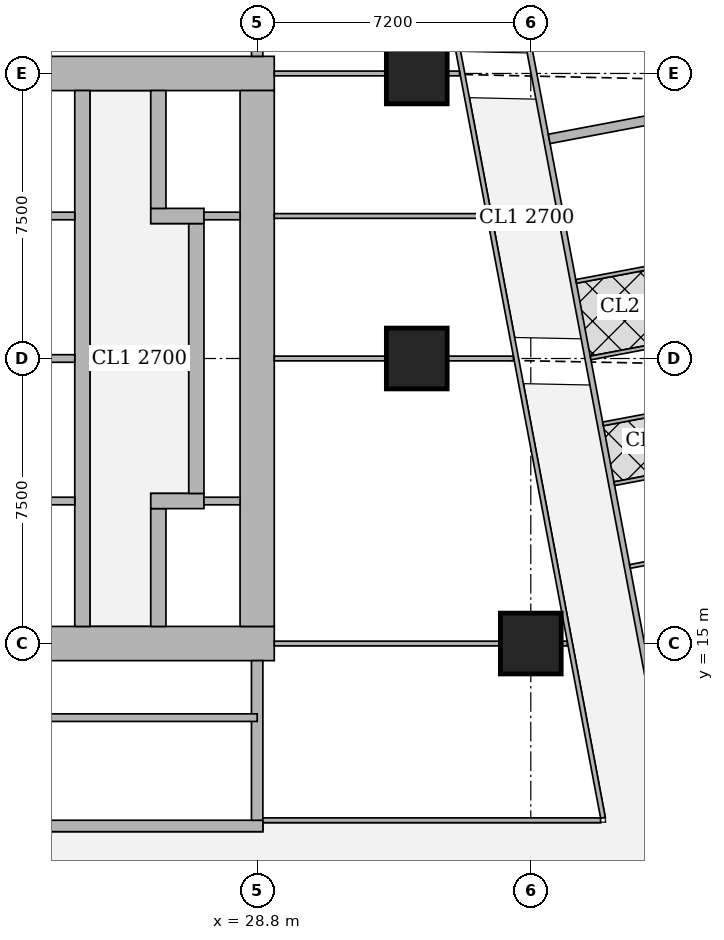
"""IFC4 building model, lengths in metres.
Left out: names, types, materials, properties, quantities, classifications, styles, units other than length and angle.
Written with IfcOpenShell. Run it as: python <this file> out.ifc"""

import sys

from ifc_helpers import new_model, si_unit, direction, frame, frame_2d, origin, origin_2d, place, context, subcontext, project, spatial, rectangle, extrude, element, fill, save


model = new_model("IFC4")
c1 = context("Model", 3, precision=1e-05, world=origin(), true_north=direction((0.0, 1.0)))
c2 = subcontext(c1, "Body", "Model", "MODEL_VIEW")
j1 = project(units=[si_unit("LENGTHUNIT", "METRE"), si_unit("PLANEANGLEUNIT", "RADIAN")], contexts=[c1])
p1 = place(None, origin())
s1 = spatial("IfcSite", under=j1, at=p1, CompositionType="ELEMENT")
p2 = place(p1, origin())
s2 = spatial("IfcBuilding", under=s1, at=p2, CompositionType="ELEMENT")
p3 = place(p2, frame((0.0, 0.0, 89.15)))
s3 = spatial("IfcBuildingStorey", under=s2, at=p3, CompositionType="ELEMENT", Elevation=89.15)
for number, where, z_axis, x_axis in (
    (1, (36.0, 15.0, 0.0), (0.0, 0.0, 1.0), (1.0, 0.0, 0.0)),
    (2, (33.0, 22.5, 0.0), (0.0, 0.0, 1.0), (1.0, 0.0, 0.0)),
    (3, (33.0, 30.0, 0.0), (0.0, 0.0, 1.0), (1.0, 0.0, 0.0)),
):
    element("IfcColumn", number, at=place(p3, frame(where, z_axis=z_axis, x_axis=x_axis)), inside=s3, PredefinedType="COLUMN", context=c2, shape_type="SweptSolid", body=[
        extrude(rectangle(XDim=1.6, YDim=1.6, at=origin_2d()), origin(), (0.0, 0.0, 1.0), 3.75),
    ])
p4 = place(p3, frame((13.95, 15.0, 0.0), z_axis=(0.0, 0.0, 1.0), x_axis=(1.0, 0.0, 0.0)))
e4 = element("IfcWall", 4, at=p4, inside=s3, PredefinedType="SHEAR", context=c2, shape_type="SweptSolid", body=[
    extrude(rectangle(XDim=15.3, YDim=0.9, at=frame_2d((7.65, 0.0))), origin(), (0.0, 0.0, 1.0), 3.75),
])
p5 = place(p4, frame((4.45, 0.0, 0.0)))
e5 = element("IfcOpeningElement", 5, at=p5, cuts=e4, PredefinedType="OPENING", context=c2, shape_type="SweptSolid", body=[
    extrude(rectangle(XDim=1.8, YDim=2.1, at=frame_2d((0.9, 1.05))), frame((0.0, 0.46, 0.0), z_axis=(0.0, -1.0, 0.0), x_axis=(1.0, 0.0, 0.0)), (0.0, 0.0, 1.0), 0.92),
])
p6 = place(p4, frame((10.7, 0.0, 0.0)))
e6 = element("IfcOpeningElement", 6, at=p6, cuts=e4, PredefinedType="OPENING", context=c2, shape_type="SweptSolid", body=[
    extrude(rectangle(XDim=1.1, YDim=2.1, at=frame_2d((0.55, 1.05))), frame((0.0, 0.46, 0.0), z_axis=(0.0, -1.0, 0.0), x_axis=(1.0, 0.0, 0.0)), (0.0, 0.0, 1.0), 0.92),
])
p7 = place(p3, frame((13.95, 30.0, 0.0), z_axis=(0.0, 0.0, 1.0), x_axis=(1.0, 0.0, 0.0)))
e7 = element("IfcWall", 7, at=p7, inside=s3, PredefinedType="SHEAR", context=c2, shape_type="SweptSolid", body=[
    extrude(rectangle(XDim=15.3, YDim=0.9, at=frame_2d((7.65, 0.0))), origin(), (0.0, 0.0, 1.0), 3.75),
])
p8 = place(p7, frame((4.45, 0.0, 0.0)))
e8 = element("IfcOpeningElement", 8, at=p8, cuts=e7, PredefinedType="OPENING", context=c2, shape_type="SweptSolid", body=[
    extrude(rectangle(XDim=1.8, YDim=2.1, at=frame_2d((0.9, 1.05))), frame((0.0, 0.46, 0.0), z_axis=(0.0, -1.0, 0.0), x_axis=(1.0, 0.0, 0.0)), (0.0, 0.0, 1.0), 0.92),
])
p9 = place(p7, frame((10.7, 0.0, 0.0)))
e9 = element("IfcOpeningElement", 9, at=p9, cuts=e7, PredefinedType="OPENING", context=c2, shape_type="SweptSolid", body=[
    extrude(rectangle(XDim=1.1, YDim=2.1, at=frame_2d((0.55, 1.05))), frame((0.0, 0.46, 0.0), z_axis=(0.0, -1.0, 0.0), x_axis=(1.0, 0.0, 0.0)), (0.0, 0.0, 1.0), 0.92),
])
p10 = place(p3, frame((28.8, 15.45, 0.0), z_axis=(0.0, 0.0, 1.0), x_axis=(0.0, 1.0, 0.0)))
e10 = element("IfcWall", 10, at=p10, inside=s3, PredefinedType="SHEAR", context=c2, shape_type="SweptSolid", body=[
    extrude(rectangle(XDim=14.1, YDim=0.9, at=frame_2d((7.05, 0.0))), origin(), (0.0, 0.0, 1.0), 3.75),
])
p11 = place(p3, frame((24.2, 15.45, 0.0), z_axis=(0.0, 0.0, 1.0), x_axis=(0.0, 1.0, 0.0)))
e11 = element("IfcWall", 11, at=p11, inside=s3, PredefinedType="SHEAR", context=c2, shape_type="SweptSolid", body=[
    extrude(rectangle(XDim=14.1, YDim=0.4, at=frame_2d((7.05, 0.0))), origin(), (0.0, 0.0, 1.0), 3.75),
])
p12 = place(p3, frame((26.2, 15.45, 0.0), z_axis=(0.0, 0.0, 1.0), x_axis=(0.0, 1.0, 0.0)))
e12 = element("IfcWall", 12, at=p12, inside=s3, PredefinedType="SHEAR", context=c2, shape_type="SweptSolid", body=[
    extrude(rectangle(XDim=3.1, YDim=0.4, at=frame_2d((1.55, 0.0))), origin(), (0.0, 0.0, 1.0), 3.75),
])
p13 = place(p12, frame((0.825, 0.0, 0.0)))
e13 = element("IfcOpeningElement", 13, at=p13, cuts=e12, PredefinedType="OPENING", context=c2, shape_type="SweptSolid", body=[
    extrude(rectangle(XDim=1.2, YDim=2.1, at=frame_2d((0.6, 1.05))), frame((0.0, 0.21, 0.0), z_axis=(0.0, -1.0, 0.0), x_axis=(1.0, 0.0, 0.0)), (0.0, 0.0, 1.0), 0.42),
])
p14 = place(p3, frame((26.0, 18.75, 0.0), z_axis=(0.0, 0.0, 1.0), x_axis=(1.0, 0.0, 0.0)))
e14 = element("IfcWall", 14, at=p14, inside=s3, PredefinedType="SHEAR", context=c2, shape_type="SweptSolid", body=[
    extrude(rectangle(XDim=1.4, YDim=0.4, at=frame_2d((0.7, 0.0))), origin(), (0.0, 0.0, 1.0), 3.75),
])
p15 = place(p3, frame((27.2, 18.95, 0.0), z_axis=(0.0, 0.0, 1.0), x_axis=(0.0, 1.0, 0.0)))
e15 = element("IfcWall", 15, at=p15, inside=s3, PredefinedType="SHEAR", context=c2, shape_type="SweptSolid", body=[
    extrude(rectangle(XDim=7.1, YDim=0.4, at=frame_2d((3.55, 0.0))), origin(), (0.0, 0.0, 1.0), 3.75),
])
p16 = place(p3, frame((26.0, 26.25, 0.0), z_axis=(0.0, 0.0, 1.0), x_axis=(1.0, 0.0, 0.0)))
e16 = element("IfcWall", 16, at=p16, inside=s3, PredefinedType="SHEAR", context=c2, shape_type="SweptSolid", body=[
    extrude(rectangle(XDim=1.4, YDim=0.4, at=frame_2d((0.7, 0.0))), origin(), (0.0, 0.0, 1.0), 3.75),
])
p17 = place(p3, frame((26.2, 26.45, 0.0), z_axis=(0.0, 0.0, 1.0), x_axis=(0.0, 1.0, 0.0)))
e17 = element("IfcWall", 17, at=p17, inside=s3, PredefinedType="SHEAR", context=c2, shape_type="SweptSolid", body=[
    extrude(rectangle(XDim=3.1, YDim=0.4, at=frame_2d((1.55, 0.0))), origin(), (0.0, 0.0, 1.0), 3.75),
])
p18 = place(p17, frame((1.075, 0.0, 0.0)))
e18 = element("IfcOpeningElement", 18, at=p18, cuts=e17, PredefinedType="OPENING", context=c2, shape_type="SweptSolid", body=[
    extrude(rectangle(XDim=1.2, YDim=2.1, at=frame_2d((0.6, 1.05))), frame((0.0, 0.21, 0.0), z_axis=(0.0, -1.0, 0.0), x_axis=(1.0, 0.0, 0.0)), (0.0, 0.0, 1.0), 0.42),
])
p19 = place(p3, frame((21.45, 10.2, 0.0), z_axis=(0.0, 0.0, 1.0), x_axis=(1.0, 0.0, 0.0)))
e19 = element("IfcWall", 19, at=p19, inside=s3, PredefinedType="SHEAR", context=c2, shape_type="SweptSolid", body=[
    extrude(rectangle(XDim=7.5, YDim=0.3, at=frame_2d((3.75, 0.0))), origin(), (0.0, 0.0, 1.0), 3.75),
])
p20 = place(p19, frame((0.5, 0.0, 0.0)))
e20 = element("IfcOpeningElement", 20, at=p20, cuts=e19, PredefinedType="OPENING", context=c2, shape_type="SweptSolid", body=[
    extrude(rectangle(XDim=1.1, YDim=2.1, at=frame_2d((0.55, 1.05))), frame((0.0, 0.16, 0.0), z_axis=(0.0, -1.0, 0.0), x_axis=(1.0, 0.0, 0.0)), (0.0, 0.0, 1.0), 0.32),
])
for number, where, z_axis, x_axis in (
    (21, (28.8, 10.35, 0.0), (0.0, 0.0, 1.0), (0.0, 1.0, 0.0)),
    (22, (28.8, 30.45, 0.0), (0.0, 0.0, 1.0), (0.0, 1.0, 0.0)),
):
    element("IfcWall", number, at=place(p3, frame(where, z_axis=z_axis, x_axis=x_axis)), inside=s3, PredefinedType="SHEAR", context=c2, shape_type="SweptSolid", body=[
        extrude(rectangle(XDim=4.2, YDim=0.3, at=frame_2d((2.1, 0.0))), origin(), (0.0, 0.0, 1.0), 3.75),
    ])
p21 = place(p3, frame((33.127, 45.65, 0.0), z_axis=(0.0, 0.0, 1.0), x_axis=(0.185598547723, -0.98262565562, 0.0)))
e23 = element("IfcWall", 23, at=p21, inside=s3, PredefinedType="SOLIDWALL", context=c2, shape_type="SweptSolid", body=[
    extrude(rectangle(XDim=47.118, YDim=0.15, at=frame_2d((23.559, 0.0))), origin(), (0.0, 0.0, 1.0), 2.2),
])
p22 = place(p21, frame((15.285, 0.0, 0.0)))
e24 = element("IfcOpeningElement", 24, at=p22, cuts=e23, PredefinedType="OPENING", context=c2, shape_type="SweptSolid", body=[
    extrude(rectangle(XDim=1.0, YDim=2.1, at=frame_2d((0.5, 1.05))), frame((0.0, 0.085, 0.0), z_axis=(0.0, -1.0, 0.0), x_axis=(1.0, 0.0, 0.0)), (0.0, 0.0, 1.0), 0.17),
])
p23 = place(p21, frame((19.102, 0.0, 0.0)))
e25 = element("IfcOpeningElement", 25, at=p23, cuts=e23, PredefinedType="OPENING", context=c2, shape_type="SweptSolid", body=[
    extrude(rectangle(XDim=1.0, YDim=2.1, at=frame_2d((0.5, 1.05))), frame((0.0, 0.085, 0.0), z_axis=(0.0, -1.0, 0.0), x_axis=(1.0, 0.0, 0.0)), (0.0, 0.0, 1.0), 0.17),
])
p24 = place(p21, frame((33.88, 0.0, 0.0)))
e26 = element("IfcOpeningElement", 26, at=p24, cuts=e23, PredefinedType="OPENING", context=c2, shape_type="SweptSolid", body=[
    extrude(rectangle(XDim=1.0, YDim=2.1, at=frame_2d((0.5, 1.05))), frame((0.0, 0.085, 0.0), z_axis=(0.0, -1.0, 0.0), x_axis=(1.0, 0.0, 0.0)), (0.0, 0.0, 1.0), 0.17),
])
p25 = place(p3, frame((40.657, 25.183, 0.0), z_axis=(0.0, 0.0, 1.0), x_axis=(-0.982585626838, -0.185810349366, 0.0)))
e27 = element("IfcWall", 27, at=p25, inside=s3, PredefinedType="PARTITIONING", context=c2, shape_type="SweptSolid", body=[
    extrude(rectangle(XDim=3.525, YDim=0.1, at=frame_2d((1.763, 0.0))), origin(), (0.0, 0.0, 1.0), 3.5),
])
p26 = place(p3, frame((41.365, 21.433, 0.0), z_axis=(0.0, 0.0, 1.0), x_axis=(-0.982638553676, -0.185530247748, 0.0)))
e28 = element("IfcWall", 28, at=p26, inside=s3, PredefinedType="PARTITIONING", context=c2, shape_type="SweptSolid", body=[
    extrude(rectangle(XDim=3.525, YDim=0.1, at=frame_2d((1.763, 0.0))), origin(), (0.0, 0.0, 1.0), 3.5),
])
p27 = place(p3, frame((42.073, 17.682, 0.0), z_axis=(0.0, 0.0, 1.0), x_axis=(-0.98265117712, -0.185463376723, 0.0)))
e29 = element("IfcWall", 29, at=p27, inside=s3, PredefinedType="PARTITIONING", context=c2, shape_type="SweptSolid", body=[
    extrude(rectangle(XDim=3.525, YDim=0.1, at=frame_2d((1.763, 0.0))), origin(), (0.0, 0.0, 1.0), 3.5),
])
p28 = place(p27, frame((1.325, 0.0, 0.0)))
e30 = element("IfcOpeningElement", 30, at=p28, cuts=e29, PredefinedType="OPENING", context=c2, shape_type="SweptSolid", body=[
    extrude(rectangle(XDim=0.9, YDim=2.1, at=frame_2d((0.45, 1.05))), frame((0.0, 0.06, 0.0), z_axis=(0.0, -1.0, 0.0), x_axis=(1.0, 0.0, 0.0)), (0.0, 0.0, 1.0), 0.12),
])
p29 = place(p3, frame((41.037, 23.168, 0.0), z_axis=(0.0, 0.0, 1.0), x_axis=(-0.982638553676, -0.185530247748, 0.0)))
e31 = element("IfcWall", 31, at=p29, inside=s3, PredefinedType="PARTITIONING", context=c2, shape_type="SweptSolid", body=[
    extrude(rectangle(XDim=3.525, YDim=0.1, at=frame_2d((1.763, 0.0))), origin(), (0.0, 0.0, 1.0), 2.5),
])
p30 = place(p3, frame((41.662, 19.861, 0.0), z_axis=(0.0, 0.0, 1.0), x_axis=(-0.982588017646, -0.185797706064, 0.0)))
e32 = element("IfcWall", 32, at=p30, inside=s3, PredefinedType="PARTITIONING", context=c2, shape_type="SweptSolid", body=[
    extrude(rectangle(XDim=3.525, YDim=0.1, at=frame_2d((1.763, 0.0))), origin(), (0.0, 0.0, 1.0), 3.5),
])
p31 = place(p3, frame((41.177, 29.164, 0.0), z_axis=(0.0, 0.0, 1.0), x_axis=(-0.982642846239, -0.185507511263, 0.0)))
e33 = element("IfcWall", 33, at=p31, inside=s3, PredefinedType="SOLIDWALL", context=c2, shape_type="SweptSolid", body=[
    extrude(rectangle(XDim=4.776, YDim=0.25, at=frame_2d((2.388, 0.0))), origin(), (0.0, 0.0, 1.0), 2.5),
])
p32 = place(p3, frame((28.95, 10.35, 0.0), z_axis=(0.0, 0.0, 1.0), x_axis=(1.0, 0.0, 0.0)))
e34 = element("IfcWall", 34, at=p32, inside=s3, PredefinedType="PARTITIONING", context=c2, shape_type="SweptSolid", body=[
    extrude(rectangle(XDim=8.886, YDim=0.125, at=frame_2d((4.443, 0.0))), origin(), (0.0, 0.0, 1.0), 3.5),
])
p33 = place(p3, frame((37.9, 10.413, 0.0), z_axis=(0.0, 0.0, 1.0), x_axis=(-0.185589740669, 0.982627319058, 0.0)))
e35 = element("IfcWall", 35, at=p33, inside=s3, PredefinedType="PARTITIONING", context=c2, shape_type="SweptSolid", body=[
    extrude(rectangle(XDim=24.602, YDim=0.125, at=frame_2d((12.301, 0.0))), origin(), (0.0, 0.0, 1.0), 2.5),
])
p34 = place(p33, frame((0.708, 0.0, 0.0)))
e36 = element("IfcOpeningElement", 36, at=p34, cuts=e35, PredefinedType="OPENING", context=c2, shape_type="SweptSolid", body=[
    extrude(rectangle(XDim=1.0, YDim=2.1, at=frame_2d((0.5, 1.05))), frame((0.0, 0.073, 0.0), z_axis=(0.0, -1.0, 0.0), x_axis=(1.0, 0.0, 0.0)), (0.0, 0.0, 1.0), 0.145),
])
p35 = place(p33, frame((5.75, 0.0, 0.0)))
e37 = element("IfcOpeningElement", 37, at=p35, cuts=e35, PredefinedType="OPENING", context=c2, shape_type="SweptSolid", body=[
    extrude(rectangle(XDim=1.0, YDim=2.1, at=frame_2d((0.5, 1.05))), frame((0.0, 0.073, 0.0), z_axis=(0.0, -1.0, 0.0), x_axis=(1.0, 0.0, 0.0)), (0.0, 0.0, 1.0), 0.145),
])
p36 = place(p33, frame((13.124, 0.0, 0.0)))
e38 = element("IfcOpeningElement", 38, at=p36, cuts=e35, PredefinedType="OPENING", context=c2, shape_type="SweptSolid", body=[
    extrude(rectangle(XDim=1.0, YDim=2.1, at=frame_2d((0.5, 1.05))), frame((0.0, 0.073, 0.0), z_axis=(0.0, -1.0, 0.0), x_axis=(1.0, 0.0, 0.0)), (0.0, 0.0, 1.0), 0.145),
])
p37 = place(p33, frame((16.94, 0.0, 0.0)))
e39 = element("IfcOpeningElement", 39, at=p37, cuts=e35, PredefinedType="OPENING", context=c2, shape_type="SweptSolid", body=[
    extrude(rectangle(XDim=1.0, YDim=2.1, at=frame_2d((0.5, 1.05))), frame((0.0, 0.073, 0.0), z_axis=(0.0, -1.0, 0.0), x_axis=(1.0, 0.0, 0.0)), (0.0, 0.0, 1.0), 0.145),
])
p38 = place(p33, frame((21.0, 0.0, 0.0)))
e40 = element("IfcOpeningElement", 40, at=p38, cuts=e35, PredefinedType="OPENING", context=c2, shape_type="SweptSolid", body=[
    extrude(rectangle(XDim=1.0, YDim=2.1, at=frame_2d((0.5, 1.05))), frame((0.0, 0.073, 0.0), z_axis=(0.0, -1.0, 0.0), x_axis=(1.0, 0.0, 0.0)), (0.0, 0.0, 1.0), 0.145),
])
p39 = place(p3, frame((29.25, 15.0, 0.0), z_axis=(0.0, 0.0, 1.0), x_axis=(1.0, 0.0, 0.0)))
e41 = element("IfcWall", 41, at=p39, inside=s3, PredefinedType="PARTITIONING", context=c2, shape_type="SweptSolid", body=[
    extrude(rectangle(XDim=5.949, YDim=0.125, at=frame_2d((2.975, 0.0))), origin(), (0.0, 0.0, 1.0), 3.5),
])
p40 = place(p3, frame((36.801, 15.0, 0.0), z_axis=(0.0, 0.0, 1.0), x_axis=(1.0, 0.0, 0.0)))
e42 = element("IfcWall", 42, at=p40, inside=s3, PredefinedType="PARTITIONING", context=c2, shape_type="SweptSolid", body=[
    extrude(rectangle(XDim=0.157, YDim=0.125, at=frame_2d((0.079, 0.0))), origin(), (0.0, 0.0, 1.0), 3.5),
])
p41 = place(p3, frame((29.25, 22.5, 0.0), z_axis=(0.0, 0.0, 1.0), x_axis=(1.0, 0.0, 0.0)))
e43 = element("IfcWall", 43, at=p41, inside=s3, PredefinedType="PARTITIONING", context=c2, shape_type="SweptSolid", body=[
    extrude(rectangle(XDim=2.949, YDim=0.125, at=frame_2d((1.475, 0.0))), origin(), (0.0, 0.0, 1.0), 3.5),
])
p42 = place(p3, frame((33.801, 22.5, 0.0), z_axis=(0.0, 0.0, 1.0), x_axis=(1.0, 0.0, 0.0)))
e44 = element("IfcWall", 44, at=p42, inside=s3, PredefinedType="PARTITIONING", context=c2, shape_type="SweptSolid", body=[
    extrude(rectangle(XDim=1.741, YDim=0.125, at=frame_2d((0.871, 0.0))), origin(), (0.0, 0.0, 1.0), 2.5),
])
p43 = place(p3, frame((29.25, 26.25, 0.0), z_axis=(0.0, 0.0, 1.0), x_axis=(1.0, 0.0, 0.0)))
e45 = element("IfcWall", 45, at=p43, inside=s3, PredefinedType="PARTITIONING", context=c2, shape_type="SweptSolid", body=[
    extrude(rectangle(XDim=5.583, YDim=0.125, at=frame_2d((2.792, 0.0))), origin(), (0.0, 0.0, 1.0), 3.5),
])
p44 = place(p3, frame((29.25, 30.0, 0.0), z_axis=(0.0, 0.0, 1.0), x_axis=(1.0, 0.0, 0.0)))
e46 = element("IfcWall", 46, at=p44, inside=s3, PredefinedType="PARTITIONING", context=c2, shape_type="SweptSolid", body=[
    extrude(rectangle(XDim=2.949, YDim=0.125, at=frame_2d((1.475, 0.0))), origin(), (0.0, 0.0, 1.0), 3.5),
])
p45 = place(p3, frame((33.801, 30.0, 0.0), z_axis=(0.0, 0.0, 1.0), x_axis=(1.0, 0.0, 0.0)))
e47 = element("IfcWall", 47, at=p45, inside=s3, PredefinedType="PARTITIONING", context=c2, shape_type="SweptSolid", body=[
    extrude(rectangle(XDim=0.324, YDim=0.125, at=frame_2d((0.162, 0.0))), origin(), (0.0, 0.0, 1.0), 2.5),
])
p46 = place(p3, frame((23.0, 13.05, 0.0), z_axis=(0.0, 0.0, 1.0), x_axis=(1.0, 0.0, 0.0)))
e48 = element("IfcWall", 48, at=p46, inside=s3, PredefinedType="SHEAR", context=c2, shape_type="SweptSolid", body=[
    extrude(rectangle(XDim=5.8, YDim=0.2, at=frame_2d((2.9, 0.0))), origin(), (0.0, 0.0, 1.0), 3.75),
])
for number, where, z_axis, x_axis in (
    (49, (21.8, 18.75, 0.0), (0.0, 0.0, 1.0), (1.0, 0.0, 0.0)),
    (50, (21.8, 22.5, 0.0), (0.0, 0.0, 1.0), (1.0, 0.0, 0.0)),
    (51, (21.8, 26.25, 0.0), (0.0, 0.0, 1.0), (1.0, 0.0, 0.0)),
):
    element("IfcWall", number, at=place(p3, frame(where, z_axis=z_axis, x_axis=x_axis)), inside=s3, PredefinedType="SOLIDWALL", context=c2, shape_type="SweptSolid", body=[
        extrude(rectangle(XDim=2.2, YDim=0.2, at=frame_2d((1.1, 0.0))), origin(), (0.0, 0.0, 1.0), 3.5),
    ])
for number, where, z_axis, x_axis in (
    (52, (27.4, 18.75, 0.0), (0.0, 0.0, 1.0), (1.0, 0.0, 0.0)),
    (53, (27.4, 26.25, 0.0), (0.0, 0.0, 1.0), (1.0, 0.0, 0.0)),
):
    element("IfcWall", number, at=place(p3, frame(where, z_axis=z_axis, x_axis=x_axis)), inside=s3, PredefinedType="SOLIDWALL", context=c2, shape_type="SweptSolid", body=[
        extrude(rectangle(XDim=0.95, YDim=0.2, at=frame_2d((0.475, 0.0))), origin(), (0.0, 0.0, 1.0), 3.5),
    ])
p47 = place(p22, origin())
e54 = element("IfcDoor", 54, at=p47, inside=s3, OperationType="SINGLE_SWING_LEFT", PredefinedType="DOOR", context=c2, shape_type="SweptSolid", body=[
    extrude(rectangle(XDim=1.0, YDim=2.1, at=frame_2d((0.5, 1.05))), frame((0.0, 0.025, 0.0), z_axis=(0.0, -1.0, 0.0), x_axis=(1.0, 0.0, 0.0)), (0.0, 0.0, 1.0), 0.05),
])
fill(e24, e54)
p48 = place(p23, origin())
e55 = element("IfcDoor", 55, at=p48, inside=s3, OperationType="SINGLE_SWING_LEFT", PredefinedType="DOOR", context=c2, shape_type="SweptSolid", body=[
    extrude(rectangle(XDim=1.0, YDim=2.1, at=frame_2d((0.5, 1.05))), frame((0.0, 0.025, 0.0), z_axis=(0.0, -1.0, 0.0), x_axis=(1.0, 0.0, 0.0)), (0.0, 0.0, 1.0), 0.05),
])
fill(e25, e55)
p49 = place(p34, origin())
e56 = element("IfcDoor", 56, at=p49, inside=s3, OperationType="SINGLE_SWING_LEFT", PredefinedType="DOOR", context=c2, shape_type="SweptSolid", body=[
    extrude(rectangle(XDim=1.0, YDim=2.1, at=frame_2d((0.5, 1.05))), frame((0.0, 0.025, 0.0), z_axis=(0.0, -1.0, 0.0), x_axis=(1.0, 0.0, 0.0)), (0.0, 0.0, 1.0), 0.05),
])
fill(e36, e56)
p50 = place(p35, origin())
e57 = element("IfcDoor", 57, at=p50, inside=s3, OperationType="SINGLE_SWING_LEFT", PredefinedType="DOOR", context=c2, shape_type="SweptSolid", body=[
    extrude(rectangle(XDim=1.0, YDim=2.1, at=frame_2d((0.5, 1.05))), frame((0.0, 0.025, 0.0), z_axis=(0.0, -1.0, 0.0), x_axis=(1.0, 0.0, 0.0)), (0.0, 0.0, 1.0), 0.05),
])
fill(e37, e57)
p51 = place(p36, origin())
e58 = element("IfcDoor", 58, at=p51, inside=s3, OperationType="SINGLE_SWING_LEFT", PredefinedType="DOOR", context=c2, shape_type="SweptSolid", body=[
    extrude(rectangle(XDim=1.0, YDim=2.1, at=frame_2d((0.5, 1.05))), frame((0.0, 0.025, 0.0), z_axis=(0.0, -1.0, 0.0), x_axis=(1.0, 0.0, 0.0)), (0.0, 0.0, 1.0), 0.05),
])
fill(e38, e58)
p52 = place(p37, origin())
e59 = element("IfcDoor", 59, at=p52, inside=s3, OperationType="SINGLE_SWING_LEFT", PredefinedType="DOOR", context=c2, shape_type="SweptSolid", body=[
    extrude(rectangle(XDim=1.0, YDim=2.1, at=frame_2d((0.5, 1.05))), frame((0.0, 0.025, 0.0), z_axis=(0.0, -1.0, 0.0), x_axis=(1.0, 0.0, 0.0)), (0.0, 0.0, 1.0), 0.05),
])
fill(e39, e59)
p53 = place(p6, origin())
e60 = element("IfcDoor", 60, at=p53, inside=s3, OperationType="SINGLE_SWING_LEFT", PredefinedType="DOOR", context=c2, shape_type="SweptSolid", body=[
    extrude(rectangle(XDim=1.1, YDim=2.1, at=frame_2d((0.55, 1.05))), frame((0.0, 0.025, 0.0), z_axis=(0.0, -1.0, 0.0), x_axis=(1.0, 0.0, 0.0)), (0.0, 0.0, 1.0), 0.05),
])
fill(e6, e60)
p54 = place(p9, origin())
e61 = element("IfcDoor", 61, at=p54, inside=s3, OperationType="SINGLE_SWING_LEFT", PredefinedType="DOOR", context=c2, shape_type="SweptSolid", body=[
    extrude(rectangle(XDim=1.1, YDim=2.1, at=frame_2d((0.55, 1.05))), frame((0.0, 0.025, 0.0), z_axis=(0.0, -1.0, 0.0), x_axis=(1.0, 0.0, 0.0)), (0.0, 0.0, 1.0), 0.05),
])
fill(e9, e61)
p55 = place(p13, origin())
e62 = element("IfcDoor", 62, at=p55, inside=s3, OperationType="DOUBLE_DOOR_SLIDING", PredefinedType="DOOR", context=c2, shape_type="SweptSolid", body=[
    extrude(rectangle(XDim=1.2, YDim=2.1, at=frame_2d((0.6, 1.05))), frame((0.0, 0.025, 0.0), z_axis=(0.0, -1.0, 0.0), x_axis=(1.0, 0.0, 0.0)), (0.0, 0.0, 1.0), 0.05),
])
fill(e13, e62)
p56 = place(p18, origin())
e63 = element("IfcDoor", 63, at=p56, inside=s3, OperationType="DOUBLE_DOOR_SLIDING", PredefinedType="DOOR", context=c2, shape_type="SweptSolid", body=[
    extrude(rectangle(XDim=1.2, YDim=2.1, at=frame_2d((0.6, 1.05))), frame((0.0, 0.025, 0.0), z_axis=(0.0, -1.0, 0.0), x_axis=(1.0, 0.0, 0.0)), (0.0, 0.0, 1.0), 0.05),
])
fill(e18, e63)
save(model, sys.argv[1])
